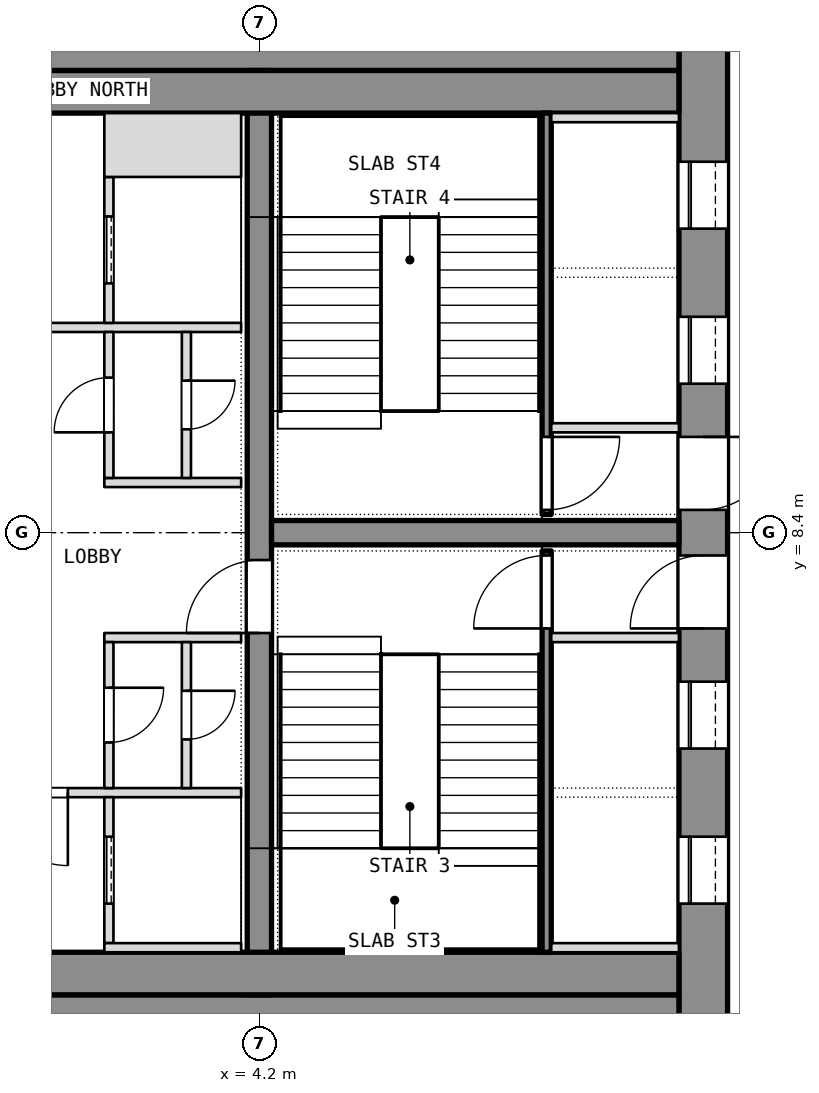
"""IFC4 building model, lengths in metres.
Left out: names, types, materials, properties, quantities, classifications, styles, units other than length and angle.
Written with IfcOpenShell. Run it as: python <this file> out.ifc"""

import sys

from ifc_helpers import new_model, si_unit, direction, frame, frame_2d, origin, place, context, subcontext, project, spatial, rectangle, extrude, element, fill, save


model = new_model("IFC4")
c1 = context("Model", 3, precision=1e-05, world=origin(), true_north=direction((0.0, 1.0)))
c2 = subcontext(c1, "Body", "Model", "MODEL_VIEW")
j1 = project(units=[si_unit("LENGTHUNIT", "METRE"), si_unit("PLANEANGLEUNIT", "RADIAN")], contexts=[c1])
p1 = place(None, origin())
s1 = spatial("IfcSite", under=j1, at=p1, CompositionType="ELEMENT")
p2 = place(p1, origin())
s2 = spatial("IfcBuilding", under=s1, at=p2, CompositionType="ELEMENT")
p3 = place(p2, frame((0.0, 0.0, 198.5)))
s3 = spatial("IfcBuildingStorey", under=s2, at=p3, CompositionType="ELEMENT", Elevation=198.5)
p4 = place(p3, frame((11.5, 0.0, 0.0), z_axis=(0.0, 0.0, 1.0), x_axis=(0.0, 1.0, 0.0)))
e1 = element("IfcWall", 1, at=p4, inside=s3, PredefinedType="SHEAR", context=c2, shape_type="SweptSolid", body=[
    extrude(rectangle(XDim=16.8, YDim=0.8, at=frame_2d((8.4, 0.0))), origin(), (0.0, 0.0, 1.0), 3.6),
])
p5 = place(p4, frame((2.3, 0.0, 0.0)))
e2 = element("IfcOpeningElement", 2, at=p5, cuts=e1, PredefinedType="OPENING", context=c2, shape_type="SweptSolid", body=[
    extrude(rectangle(XDim=1.1, YDim=2.1, at=frame_2d((0.55, 1.05))), frame((0.0, 0.4, 0.0), z_axis=(0.0, -1.0, 0.0), x_axis=(1.0, 0.0, 0.0)), (0.0, 0.0, 1.0), 0.8),
])
p6 = place(p4, frame((4.85, 0.0, 0.0)))
e3 = element("IfcOpeningElement", 3, at=p6, cuts=e1, PredefinedType="OPENING", context=c2, shape_type="SweptSolid", body=[
    extrude(rectangle(XDim=1.1, YDim=2.1, at=frame_2d((0.55, 1.05))), frame((0.0, 0.4, 0.0), z_axis=(0.0, -1.0, 0.0), x_axis=(1.0, 0.0, 0.0)), (0.0, 0.0, 1.0), 0.8),
])
p7 = place(p4, frame((6.825, 0.0, 0.0)))
e4 = element("IfcOpeningElement", 4, at=p7, cuts=e1, PredefinedType="OPENING", context=c2, shape_type="SweptSolid", body=[
    extrude(rectangle(XDim=1.2, YDim=2.1, at=frame_2d((0.6, 1.05))), frame((0.0, 0.4, 0.0), z_axis=(0.0, -1.0, 0.0), x_axis=(1.0, 0.0, 0.0)), (0.0, 0.0, 1.0), 0.8),
])
p8 = place(p4, frame((13.4, 0.0, 0.0)))
e5 = element("IfcOpeningElement", 5, at=p8, cuts=e1, PredefinedType="OPENING", context=c2, shape_type="SweptSolid", body=[
    extrude(rectangle(XDim=1.1, YDim=2.1, at=frame_2d((0.55, 1.05))), frame((0.0, 0.4, 0.0), z_axis=(0.0, -1.0, 0.0), x_axis=(1.0, 0.0, 0.0)), (0.0, 0.0, 1.0), 0.8),
])
p9 = place(p4, frame((10.85, 0.0, 0.0)))
e6 = element("IfcOpeningElement", 6, at=p9, cuts=e1, PredefinedType="OPENING", context=c2, shape_type="SweptSolid", body=[
    extrude(rectangle(XDim=1.1, YDim=2.1, at=frame_2d((0.55, 1.05))), frame((0.0, 0.4, 0.0), z_axis=(0.0, -1.0, 0.0), x_axis=(1.0, 0.0, 0.0)), (0.0, 0.0, 1.0), 0.8),
])
p10 = place(p4, frame((8.775, 0.0, 0.0)))
e7 = element("IfcOpeningElement", 7, at=p10, cuts=e1, PredefinedType="OPENING", context=c2, shape_type="SweptSolid", body=[
    extrude(rectangle(XDim=1.2, YDim=2.1, at=frame_2d((0.6, 1.05))), frame((0.0, 0.4, 0.0), z_axis=(0.0, -1.0, 0.0), x_axis=(1.0, 0.0, 0.0)), (0.0, 0.0, 1.0), 0.8),
])
for number, where, z_axis, x_axis in (
    (8, (-11.1, 0.4, 0.0), (0.0, 0.0, 1.0), (1.0, 0.0, 0.0)),
    (9, (-11.1, 16.4, 0.0), (0.0, 0.0, 1.0), (1.0, 0.0, 0.0)),
):
    element("IfcWall", number, at=place(p3, frame(where, z_axis=z_axis, x_axis=x_axis)), inside=s3, PredefinedType="SHEAR", context=c2, shape_type="SweptSolid", body=[
        extrude(rectangle(XDim=22.2, YDim=0.8, at=frame_2d((11.1, 0.0))), origin(), (0.0, 0.0, 1.0), 3.6),
    ])
p11 = place(p3, frame((4.2, 0.8, 0.0), z_axis=(0.0, 0.0, 1.0), x_axis=(0.0, 1.0, 0.0)))
e10 = element("IfcWall", 10, at=p11, inside=s3, PredefinedType="SHEAR", context=c2, shape_type="SweptSolid", body=[
    extrude(rectangle(XDim=15.2, YDim=0.4, at=frame_2d((7.6, 0.0))), origin(), (0.0, 0.0, 1.0), 3.6),
])
p12 = place(p11, frame((5.95, 0.0, 0.0)))
e11 = element("IfcOpeningElement", 11, at=p12, cuts=e10, PredefinedType="OPENING", context=c2, shape_type="SweptSolid", body=[
    extrude(rectangle(XDim=1.2, YDim=2.1, at=frame_2d((0.6, 1.05))), frame((0.0, 0.2, 0.0), z_axis=(0.0, -1.0, 0.0), x_axis=(1.0, 0.0, 0.0)), (0.0, 0.0, 1.0), 0.4),
])
p13 = place(p3, frame((4.4, 8.4, 0.0), z_axis=(0.0, 0.0, 1.0), x_axis=(1.0, 0.0, 0.0)))
e12 = element("IfcWall", 12, at=p13, inside=s3, PredefinedType="SHEAR", context=c2, shape_type="SweptSolid", body=[
    extrude(rectangle(XDim=6.7, YDim=0.4, at=frame_2d((3.35, 0.0))), origin(), (0.0, 0.0, 1.0), 3.6),
])
for number, where, z_axis, x_axis in (
    (13, (-11.1, 1.15, 0.0), (0.0, 0.0, 1.0), (1.0, 0.0, 0.0)),
    (14, (-11.1, 15.65, 0.0), (0.0, 0.0, 1.0), (1.0, 0.0, 0.0)),
):
    element("IfcWall", number, at=place(p3, frame(where, z_axis=z_axis, x_axis=x_axis)), inside=s3, PredefinedType="PARTITIONING", context=c2, shape_type="SweptSolid", body=[
        extrude(rectangle(XDim=22.2, YDim=0.7, at=frame_2d((11.1, 0.0))), origin(), (0.0, 0.0, 1.0), 3.34),
    ])
p14 = place(p3, frame((8.925, 1.5, 0.0), z_axis=(0.0, 0.0, 1.0), x_axis=(0.0, 1.0, 0.0)))
e15 = element("IfcWall", 15, at=p14, inside=s3, PredefinedType="SHEAR", context=c2, shape_type="SweptSolid", body=[
    extrude(rectangle(XDim=6.6, YDim=0.15, at=frame_2d((3.3, 0.0))), origin(), (0.0, 0.0, 1.0), 3.34),
])
p15 = place(p14, frame((5.325, 0.0, 0.0)))
e16 = element("IfcOpeningElement", 16, at=p15, cuts=e15, PredefinedType="OPENING", context=c2, shape_type="SweptSolid", body=[
    extrude(rectangle(XDim=1.2, YDim=2.1, at=frame_2d((0.6, 1.05))), frame((0.0, 0.075, 0.0), z_axis=(0.0, -1.0, 0.0), x_axis=(1.0, 0.0, 0.0)), (0.0, 0.0, 1.0), 0.15),
])
for number, where, z_axis, x_axis in (
    (17, (9.0, 6.675, 0.0), (0.0, 0.0, 1.0), (1.0, 0.0, 0.0)),
    (18, (9.0, 1.575, 0.0), (0.0, 0.0, 1.0), (1.0, 0.0, 0.0)),
):
    element("IfcWall", number, at=place(p3, frame(where, z_axis=z_axis, x_axis=x_axis)), inside=s3, PredefinedType="SHEAR", context=c2, shape_type="SweptSolid", body=[
        extrude(rectangle(XDim=2.1, YDim=0.15, at=frame_2d((1.05, 0.0))), origin(), (0.0, 0.0, 1.0), 3.6),
    ])
p16 = place(p3, frame((8.925, 8.7, 0.0), z_axis=(0.0, 0.0, 1.0), x_axis=(0.0, 1.0, 0.0)))
e19 = element("IfcWall", 19, at=p16, inside=s3, PredefinedType="SHEAR", context=c2, shape_type="SweptSolid", body=[
    extrude(rectangle(XDim=6.6, YDim=0.15, at=frame_2d((3.3, 0.0))), origin(), (0.0, 0.0, 1.0), 3.34),
])
p17 = place(p16, frame((0.075, 0.0, 0.0)))
e20 = element("IfcOpeningElement", 20, at=p17, cuts=e19, PredefinedType="OPENING", context=c2, shape_type="SweptSolid", body=[
    extrude(rectangle(XDim=1.2, YDim=2.1, at=frame_2d((0.6, 1.05))), frame((0.0, 0.075, 0.0), z_axis=(0.0, -1.0, 0.0), x_axis=(1.0, 0.0, 0.0)), (0.0, 0.0, 1.0), 0.15),
])
for number, where, z_axis, x_axis in (
    (21, (9.0, 10.125, 0.0), (0.0, 0.0, 1.0), (1.0, 0.0, 0.0)),
    (22, (9.0, 15.225, 0.0), (0.0, 0.0, 1.0), (1.0, 0.0, 0.0)),
):
    element("IfcWall", number, at=place(p3, frame(where, z_axis=z_axis, x_axis=x_axis)), inside=s3, PredefinedType="SHEAR", context=c2, shape_type="SweptSolid", body=[
        extrude(rectangle(XDim=2.1, YDim=0.15, at=frame_2d((1.05, 0.0))), origin(), (0.0, 0.0, 1.0), 3.6),
    ])
p18 = place(p3, frame((-3.9, 4.125, 0.0), z_axis=(0.0, 0.0, 1.0), x_axis=(1.0, 0.0, 0.0)))
e23 = element("IfcWall", 23, at=p18, inside=s3, PredefinedType="PARTITIONING", context=c2, shape_type="SweptSolid", body=[
    extrude(rectangle(XDim=7.8, YDim=0.15, at=frame_2d((3.9, 0.0))), origin(), (0.0, 0.0, 1.0), 3.34),
])
p19 = place(p18, frame((3.75, 0.0, 0.0)))
e24 = element("IfcOpeningElement", 24, at=p19, cuts=e23, PredefinedType="OPENING", context=c2, shape_type="SweptSolid", body=[
    extrude(rectangle(XDim=1.2, YDim=2.1, at=frame_2d((0.6, 1.05))), frame((0.0, 0.075, 0.0), z_axis=(0.0, -1.0, 0.0), x_axis=(1.0, 0.0, 0.0)), (0.0, 0.0, 1.0), 0.15),
])
p20 = place(p3, frame((-3.9, 11.775, 0.0), z_axis=(0.0, 0.0, 1.0), x_axis=(1.0, 0.0, 0.0)))
e25 = element("IfcWall", 25, at=p20, inside=s3, PredefinedType="PARTITIONING", context=c2, shape_type="SweptSolid", body=[
    extrude(rectangle(XDim=7.8, YDim=0.15, at=frame_2d((3.9, 0.0))), origin(), (0.0, 0.0, 1.0), 3.34),
])
p21 = place(p20, frame((3.3, 0.0, 0.0)))
e26 = element("IfcOpeningElement", 26, at=p21, cuts=e25, PredefinedType="OPENING", context=c2, shape_type="SweptSolid", body=[
    extrude(rectangle(XDim=1.2, YDim=2.1, at=frame_2d((0.6, 1.05))), frame((0.0, 0.075, 0.0), z_axis=(0.0, -1.0, 0.0), x_axis=(1.0, 0.0, 0.0)), (0.0, 0.0, 1.0), 0.15),
])
p22 = place(p3, frame((1.725, 1.65, 0.0), z_axis=(0.0, 0.0, 1.0), x_axis=(0.0, 1.0, 0.0)))
e27 = element("IfcWall", 27, at=p22, inside=s3, PredefinedType="SHEAR", context=c2, shape_type="SweptSolid", body=[
    extrude(rectangle(XDim=2.4, YDim=0.15, at=frame_2d((1.2, 0.0))), origin(), (0.0, 0.0, 1.0), 3.6),
])
p23 = place(p22, frame((0.65, 0.0, 0.0)))
e28 = element("IfcOpeningElement", 28, at=p23, cuts=e27, PredefinedType="OPENING", context=c2, shape_type="SweptSolid", body=[
    extrude(rectangle(XDim=1.1, YDim=2.1, at=frame_2d((0.55, 1.05))), frame((0.0, 0.075, 0.0), z_axis=(0.0, -1.0, 0.0), x_axis=(1.0, 0.0, 0.0)), (0.0, 0.0, 1.0), 0.15),
])
p24 = place(p3, frame((1.65, 1.575, 0.0), z_axis=(0.0, 0.0, 1.0), x_axis=(1.0, 0.0, 0.0)))
e29 = element("IfcWall", 29, at=p24, inside=s3, PredefinedType="SHEAR", context=c2, shape_type="SweptSolid", body=[
    extrude(rectangle(XDim=2.25, YDim=0.15, at=frame_2d((1.125, 0.0))), origin(), (0.0, 0.0, 1.0), 3.6),
])
p25 = place(p3, frame((1.725, 11.85, 0.0), z_axis=(0.0, 0.0, 1.0), x_axis=(0.0, 1.0, 0.0)))
e30 = element("IfcWall", 30, at=p25, inside=s3, PredefinedType="SHEAR", context=c2, shape_type="SweptSolid", body=[
    extrude(rectangle(XDim=2.4, YDim=0.15, at=frame_2d((1.2, 0.0))), origin(), (0.0, 0.0, 1.0), 3.6),
])
p26 = place(p25, frame((0.65, 0.0, 0.0)))
e31 = element("IfcOpeningElement", 31, at=p26, cuts=e30, PredefinedType="OPENING", context=c2, shape_type="SweptSolid", body=[
    extrude(rectangle(XDim=1.1, YDim=2.1, at=frame_2d((0.55, 1.05))), frame((0.0, 0.075, 0.0), z_axis=(0.0, -1.0, 0.0), x_axis=(1.0, 0.0, 0.0)), (0.0, 0.0, 1.0), 0.15),
])
p27 = place(p3, frame((1.65, 14.775, 0.0), z_axis=(0.0, 0.0, 1.0), x_axis=(1.0, 0.0, 0.0)))
e32 = element("IfcWall", 32, at=p27, inside=s3, PredefinedType="SHEAR", context=c2, shape_type="SweptSolid", body=[
    extrude(rectangle(XDim=2.25, YDim=1.05, at=frame_2d((1.125, 0.0))), origin(), (0.0, 0.0, 1.0), 3.6),
])
for number, where, z_axis, x_axis in (
    (33, (1.65, 6.675, 0.0), (0.0, 0.0, 1.0), (1.0, 0.0, 0.0)),
    (34, (1.65, 9.225, 0.0), (0.0, 0.0, 1.0), (1.0, 0.0, 0.0)),
):
    element("IfcWall", number, at=place(p3, frame(where, z_axis=z_axis, x_axis=x_axis)), inside=s3, PredefinedType="PARTITIONING", context=c2, shape_type="SweptSolid", body=[
        extrude(rectangle(XDim=2.25, YDim=0.15, at=frame_2d((1.125, 0.0))), origin(), (0.0, 0.0, 1.0), 3.34),
    ])
p28 = place(p3, frame((1.725, 4.2, 0.0), z_axis=(0.0, 0.0, 1.0), x_axis=(0.0, 1.0, 0.0)))
e35 = element("IfcWall", 35, at=p28, inside=s3, PredefinedType="PARTITIONING", context=c2, shape_type="SweptSolid", body=[
    extrude(rectangle(XDim=2.4, YDim=0.15, at=frame_2d((1.2, 0.0))), origin(), (0.0, 0.0, 1.0), 3.34),
])
p29 = place(p28, frame((0.75, 0.0, 0.0)))
e36 = element("IfcOpeningElement", 36, at=p29, cuts=e35, PredefinedType="OPENING", context=c2, shape_type="SweptSolid", body=[
    extrude(rectangle(XDim=0.9, YDim=2.1, at=frame_2d((0.45, 1.05))), frame((0.0, 0.075, 0.0), z_axis=(0.0, -1.0, 0.0), x_axis=(1.0, 0.0, 0.0)), (0.0, 0.0, 1.0), 0.15),
])
p30 = place(p3, frame((1.725, 9.3, 0.0), z_axis=(0.0, 0.0, 1.0), x_axis=(0.0, 1.0, 0.0)))
e37 = element("IfcWall", 37, at=p30, inside=s3, PredefinedType="PARTITIONING", context=c2, shape_type="SweptSolid", body=[
    extrude(rectangle(XDim=2.4, YDim=0.15, at=frame_2d((1.2, 0.0))), origin(), (0.0, 0.0, 1.0), 3.34),
])
p31 = place(p30, frame((0.75, 0.0, 0.0)))
e38 = element("IfcOpeningElement", 38, at=p31, cuts=e37, PredefinedType="OPENING", context=c2, shape_type="SweptSolid", body=[
    extrude(rectangle(XDim=0.9, YDim=2.1, at=frame_2d((0.45, 1.05))), frame((0.0, 0.075, 0.0), z_axis=(0.0, -1.0, 0.0), x_axis=(1.0, 0.0, 0.0)), (0.0, 0.0, 1.0), 0.15),
])
p32 = place(p3, frame((3.0, 4.2, 0.0), z_axis=(0.0, 0.0, 1.0), x_axis=(0.0, 1.0, 0.0)))
e39 = element("IfcWall", 39, at=p32, inside=s3, PredefinedType="PARTITIONING", context=c2, shape_type="SweptSolid", body=[
    extrude(rectangle(XDim=2.4, YDim=0.15, at=frame_2d((1.2, 0.0))), origin(), (0.0, 0.0, 1.0), 3.34),
])
p33 = place(p32, frame((0.8, 0.0, 0.0)))
e40 = element("IfcOpeningElement", 40, at=p33, cuts=e39, PredefinedType="OPENING", context=c2, shape_type="SweptSolid", body=[
    extrude(rectangle(XDim=0.8, YDim=2.1, at=frame_2d((0.4, 1.05))), frame((0.0, 0.075, 0.0), z_axis=(0.0, -1.0, 0.0), x_axis=(1.0, 0.0, 0.0)), (0.0, 0.0, 1.0), 0.15),
])
p34 = place(p3, frame((3.0, 9.3, 0.0), z_axis=(0.0, 0.0, 1.0), x_axis=(0.0, 1.0, 0.0)))
e41 = element("IfcWall", 41, at=p34, inside=s3, PredefinedType="PARTITIONING", context=c2, shape_type="SweptSolid", body=[
    extrude(rectangle(XDim=2.4, YDim=0.15, at=frame_2d((1.2, 0.0))), origin(), (0.0, 0.0, 1.0), 3.34),
])
p35 = place(p34, frame((0.8, 0.0, 0.0)))
e42 = element("IfcOpeningElement", 42, at=p35, cuts=e41, PredefinedType="OPENING", context=c2, shape_type="SweptSolid", body=[
    extrude(rectangle(XDim=0.8, YDim=2.1, at=frame_2d((0.4, 1.05))), frame((0.0, 0.075, 0.0), z_axis=(0.0, -1.0, 0.0), x_axis=(1.0, 0.0, 0.0)), (0.0, 0.0, 1.0), 0.15),
])
p36 = place(p5, origin())
e43 = element("IfcDoor", 43, at=p36, inside=s3, OperationType="SLIDING_TO_LEFT", PredefinedType="DOOR", context=c2, shape_type="SweptSolid", body=[
    extrude(rectangle(XDim=1.1, YDim=2.1, at=frame_2d((0.55, 1.05))), frame((0.0, 0.025, 0.0), z_axis=(0.0, -1.0, 0.0), x_axis=(1.0, 0.0, 0.0)), (0.0, 0.0, 1.0), 0.05),
])
fill(e2, e43)
p37 = place(p6, origin())
e44 = element("IfcDoor", 44, at=p37, inside=s3, OperationType="SLIDING_TO_LEFT", PredefinedType="DOOR", context=c2, shape_type="SweptSolid", body=[
    extrude(rectangle(XDim=1.1, YDim=2.1, at=frame_2d((0.55, 1.05))), frame((0.0, 0.025, 0.0), z_axis=(0.0, -1.0, 0.0), x_axis=(1.0, 0.0, 0.0)), (0.0, 0.0, 1.0), 0.05),
])
fill(e3, e44)
p38 = place(p7, origin())
e45 = element("IfcDoor", 45, at=p38, inside=s3, OperationType="SINGLE_SWING_LEFT", PredefinedType="DOOR", context=c2, shape_type="SweptSolid", body=[
    extrude(rectangle(XDim=1.2, YDim=2.1, at=frame_2d((0.6, 1.05))), frame((0.0, 0.025, 0.0), z_axis=(0.0, -1.0, 0.0), x_axis=(1.0, 0.0, 0.0)), (0.0, 0.0, 1.0), 0.05),
])
fill(e4, e45)
p39 = place(p15, origin())
e46 = element("IfcDoor", 46, at=p39, inside=s3, OperationType="SINGLE_SWING_LEFT", PredefinedType="DOOR", context=c2, shape_type="SweptSolid", body=[
    extrude(rectangle(XDim=1.2, YDim=2.1, at=frame_2d((0.6, 1.05))), frame((0.0, 0.025, 0.0), z_axis=(0.0, -1.0, 0.0), x_axis=(1.0, 0.0, 0.0)), (0.0, 0.0, 1.0), 0.05),
])
fill(e16, e46)
p40 = place(p8, origin())
e47 = element("IfcDoor", 47, at=p40, inside=s3, OperationType="SLIDING_TO_LEFT", PredefinedType="DOOR", context=c2, shape_type="SweptSolid", body=[
    extrude(rectangle(XDim=1.1, YDim=2.1, at=frame_2d((0.55, 1.05))), frame((0.0, 0.025, 0.0), z_axis=(0.0, -1.0, 0.0), x_axis=(1.0, 0.0, 0.0)), (0.0, 0.0, 1.0), 0.05),
])
fill(e5, e47)
p41 = place(p9, origin())
e48 = element("IfcDoor", 48, at=p41, inside=s3, OperationType="SLIDING_TO_LEFT", PredefinedType="DOOR", context=c2, shape_type="SweptSolid", body=[
    extrude(rectangle(XDim=1.1, YDim=2.1, at=frame_2d((0.55, 1.05))), frame((0.0, 0.025, 0.0), z_axis=(0.0, -1.0, 0.0), x_axis=(1.0, 0.0, 0.0)), (0.0, 0.0, 1.0), 0.05),
])
fill(e6, e48)
p42 = place(p10, origin())
e49 = element("IfcDoor", 49, at=p42, inside=s3, OperationType="SINGLE_SWING_LEFT", PredefinedType="DOOR", context=c2, shape_type="SweptSolid", body=[
    extrude(rectangle(XDim=1.2, YDim=2.1, at=frame_2d((0.6, 1.05))), frame((0.0, 0.025, 0.0), z_axis=(0.0, -1.0, 0.0), x_axis=(1.0, 0.0, 0.0)), (0.0, 0.0, 1.0), 0.05),
])
fill(e7, e49)
p43 = place(p17, origin())
e50 = element("IfcDoor", 50, at=p43, inside=s3, OperationType="SINGLE_SWING_LEFT", PredefinedType="DOOR", context=c2, shape_type="SweptSolid", body=[
    extrude(rectangle(XDim=1.2, YDim=2.1, at=frame_2d((0.6, 1.05))), frame((0.0, 0.025, 0.0), z_axis=(0.0, -1.0, 0.0), x_axis=(1.0, 0.0, 0.0)), (0.0, 0.0, 1.0), 0.05),
])
fill(e20, e50)
p44 = place(p29, origin())
e51 = element("IfcDoor", 51, at=p44, inside=s3, OperationType="SINGLE_SWING_LEFT", PredefinedType="DOOR", context=c2, shape_type="SweptSolid", body=[
    extrude(rectangle(XDim=0.9, YDim=2.1, at=frame_2d((0.45, 1.05))), frame((0.0, 0.025, 0.0), z_axis=(0.0, -1.0, 0.0), x_axis=(1.0, 0.0, 0.0)), (0.0, 0.0, 1.0), 0.05),
])
fill(e36, e51)
p45 = place(p33, origin())
e52 = element("IfcDoor", 52, at=p45, inside=s3, OperationType="SINGLE_SWING_LEFT", PredefinedType="DOOR", context=c2, shape_type="SweptSolid", body=[
    extrude(rectangle(XDim=0.8, YDim=2.1, at=frame_2d((0.4, 1.05))), frame((0.0, 0.025, 0.0), z_axis=(0.0, -1.0, 0.0), x_axis=(1.0, 0.0, 0.0)), (0.0, 0.0, 1.0), 0.05),
])
fill(e40, e52)
p46 = place(p31, origin())
e53 = element("IfcDoor", 53, at=p46, inside=s3, OperationType="SINGLE_SWING_LEFT", PredefinedType="DOOR", context=c2, shape_type="SweptSolid", body=[
    extrude(rectangle(XDim=0.9, YDim=2.1, at=frame_2d((0.45, 1.05))), frame((0.0, 0.025, 0.0), z_axis=(0.0, -1.0, 0.0), x_axis=(1.0, 0.0, 0.0)), (0.0, 0.0, 1.0), 0.05),
])
fill(e38, e53)
p47 = place(p35, origin())
e54 = element("IfcDoor", 54, at=p47, inside=s3, OperationType="SINGLE_SWING_LEFT", PredefinedType="DOOR", context=c2, shape_type="SweptSolid", body=[
    extrude(rectangle(XDim=0.8, YDim=2.1, at=frame_2d((0.4, 1.05))), frame((0.0, 0.025, 0.0), z_axis=(0.0, -1.0, 0.0), x_axis=(1.0, 0.0, 0.0)), (0.0, 0.0, 1.0), 0.05),
])
fill(e42, e54)
p48 = place(p23, origin())
e55 = element("IfcDoor", 55, at=p48, inside=s3, OperationType="SLIDING_TO_LEFT", PredefinedType="DOOR", context=c2, shape_type="SweptSolid", body=[
    extrude(rectangle(XDim=1.1, YDim=2.1, at=frame_2d((0.55, 1.05))), frame((0.0, 0.025, 0.0), z_axis=(0.0, -1.0, 0.0), x_axis=(1.0, 0.0, 0.0)), (0.0, 0.0, 1.0), 0.05),
])
fill(e28, e55)
p49 = place(p26, origin())
e56 = element("IfcDoor", 56, at=p49, inside=s3, OperationType="SLIDING_TO_LEFT", PredefinedType="DOOR", context=c2, shape_type="SweptSolid", body=[
    extrude(rectangle(XDim=1.1, YDim=2.1, at=frame_2d((0.55, 1.05))), frame((0.0, 0.025, 0.0), z_axis=(0.0, -1.0, 0.0), x_axis=(1.0, 0.0, 0.0)), (0.0, 0.0, 1.0), 0.05),
])
fill(e31, e56)
p50 = place(p19, origin())
e57 = element("IfcDoor", 57, at=p50, inside=s3, OperationType="SINGLE_SWING_LEFT", PredefinedType="DOOR", context=c2, shape_type="SweptSolid", body=[
    extrude(rectangle(XDim=1.2, YDim=2.1, at=frame_2d((0.6, 1.05))), frame((0.0, 0.025, 0.0), z_axis=(0.0, -1.0, 0.0), x_axis=(1.0, 0.0, 0.0)), (0.0, 0.0, 1.0), 0.05),
])
fill(e24, e57)
p51 = place(p12, origin())
e58 = element("IfcDoor", 58, at=p51, inside=s3, OperationType="SINGLE_SWING_LEFT", PredefinedType="DOOR", context=c2, shape_type="SweptSolid", body=[
    extrude(rectangle(XDim=1.2, YDim=2.1, at=frame_2d((0.6, 1.05))), frame((0.0, 0.025, 0.0), z_axis=(0.0, -1.0, 0.0), x_axis=(1.0, 0.0, 0.0)), (0.0, 0.0, 1.0), 0.05),
])
fill(e11, e58)
save(model, sys.argv[1])
